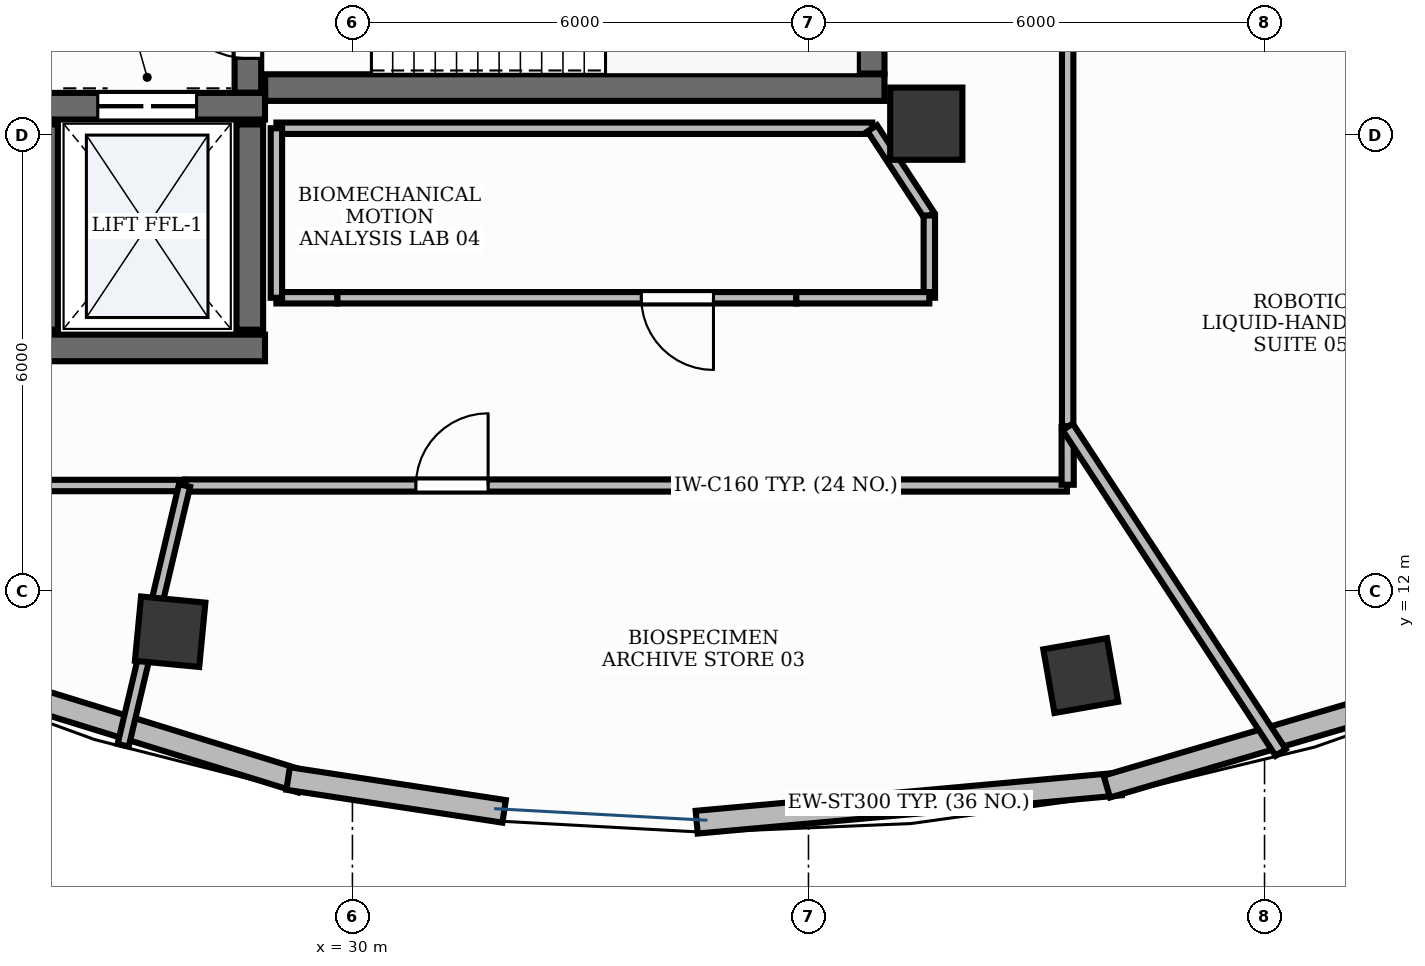
"""IFC4 building model, lengths in metres.
Left out: names, types, materials, properties, quantities, classifications, styles, units other than length and angle.
Written with IfcOpenShell. Run it as: python <this file> out.ifc"""

import sys

from ifc_helpers import new_model, si_unit, direction, frame, frame_2d, origin, origin_2d, place, context, subcontext, project, spatial, rectangle, extrude, element, fill, save


model = new_model("IFC4")
c1 = context("Model", 3, precision=1e-05, world=origin(), true_north=direction((0.0, 1.0)))
c2 = subcontext(c1, "Body", "Model", "MODEL_VIEW")
j1 = project(units=[si_unit("LENGTHUNIT", "METRE"), si_unit("PLANEANGLEUNIT", "RADIAN")], contexts=[c1])
p1 = place(None, origin())
s1 = spatial("IfcSite", under=j1, at=p1, CompositionType="ELEMENT")
p2 = place(p1, origin())
s2 = spatial("IfcBuilding", under=s1, at=p2, CompositionType="ELEMENT")
p3 = place(p2, frame((0.0, 0.0, 310.2)))
s3 = spatial("IfcBuildingStorey", under=s2, at=p3, CompositionType="ELEMENT", Elevation=310.2)
p4 = place(p3, frame((28.852, 18.625, 0.0), z_axis=(0.0, 0.0, 1.0), x_axis=(1.0, 0.0, 0.0)))
e1 = element("IfcWall", 1, at=p4, inside=s3, PredefinedType="SHEAR", context=c2, shape_type="SweptSolid", body=[
    extrude(rectangle(XDim=8.148, YDim=0.35, at=frame_2d((4.074, 0.0))), origin(), (0.0, 0.0, 1.0), 3.9),
])
p5 = place(p3, frame((36.825, 18.81, 0.0), z_axis=(0.0, 0.0, 1.0), x_axis=(0.0, 1.0, 0.0)))
e2 = element("IfcWall", 2, at=p5, inside=s3, PredefinedType="SHEAR", context=c2, shape_type="SweptSolid", body=[
    extrude(rectangle(XDim=3.08, YDim=0.35, at=frame_2d((1.54, 0.0))), origin(), (0.0, 0.0, 1.0), 3.9),
])
p6 = place(p3, frame((28.625, 18.557, 0.0), z_axis=(0.0, 0.0, 1.0), x_axis=(0.0, 1.0, 0.0)))
e3 = element("IfcWall", 3, at=p6, inside=s3, PredefinedType="SHEAR", context=c2, shape_type="SweptSolid", body=[
    extrude(rectangle(XDim=3.333, YDim=0.35, at=frame_2d((1.667, 0.0))), origin(), (0.0, 0.0, 1.0), 3.9),
])
p7 = place(p6, frame((0.453, 0.0, 0.0)))
e4 = element("IfcOpeningElement", 4, at=p7, cuts=e3, PredefinedType="OPENING", context=c2, shape_type="SweptSolid", body=[
    extrude(rectangle(XDim=1.05, YDim=2.15, at=frame_2d((0.525, 1.075))), frame((0.0, 0.19, 0.0), z_axis=(0.0, -1.0, 0.0), x_axis=(1.0, 0.0, 0.0)), (0.0, 0.0, 1.0), 0.38),
])
p8 = place(p3, frame((25.75, 15.2, 0.0), z_axis=(0.0, 0.0, 1.0), x_axis=(1.0, 0.0, 0.0)))
e5 = element("IfcWall", 5, at=p8, inside=s3, PredefinedType="SHEAR", context=c2, shape_type="SweptSolid", body=[
    extrude(rectangle(XDim=3.1, YDim=0.35, at=frame_2d((1.55, 0.0))), origin(), (0.0, 0.0, 1.0), 3.9),
])
p9 = place(p3, frame((25.75, 18.38, 0.0), z_axis=(0.0, 0.0, 1.0), x_axis=(1.0, 0.0, 0.0)))
e6 = element("IfcWall", 6, at=p9, inside=s3, PredefinedType="SHEAR", context=c2, shape_type="SweptSolid", body=[
    extrude(rectangle(XDim=3.1, YDim=0.35, at=frame_2d((1.55, 0.0))), origin(), (0.0, 0.0, 1.0), 3.9),
])
p10 = place(p9, frame((0.9, 0.0, 0.0)))
e7 = element("IfcOpeningElement", 7, at=p10, cuts=e6, PredefinedType="OPENING", context=c2, shape_type="SweptSolid", body=[
    extrude(rectangle(XDim=1.3, YDim=2.2, at=frame_2d((0.65, 1.1))), frame((0.0, 0.19, 0.0), z_axis=(0.0, -1.0, 0.0), x_axis=(1.0, 0.0, 0.0)), (0.0, 0.0, 1.0), 0.38),
])
for number, where, z_axis, x_axis in (
    (8, (25.95, 15.44, 0.0), (0.0, 0.0, 1.0), (0.0, 1.0, 0.0)),
    (9, (28.65, 15.44, 0.0), (0.0, 0.0, 1.0), (0.0, 1.0, 0.0)),
):
    element("IfcWall", number, at=place(p3, frame(where, z_axis=z_axis, x_axis=x_axis)), inside=s3, PredefinedType="SHEAR", context=c2, shape_type="SweptSolid", body=[
        extrude(rectangle(XDim=2.7, YDim=0.35, at=frame_2d((1.35, 0.0))), origin(), (0.0, 0.0, 1.0), 3.9),
    ])
p11 = place(p3, frame((37.55, 18.15, -0.0), z_axis=(0.0, 0.0, 1.0), x_axis=(1.0, 0.0, 0.0)))
e10 = element("IfcColumn", 10, at=p11, inside=s3, PredefinedType="PILASTER", context=c2, shape_type="SweptSolid", body=[
    extrude(rectangle(XDim=0.95, YDim=0.95, at=origin_2d()), origin(), (0.0, 0.0, 1.0), 3.901),
])
for number, where, z_axis, x_axis in (
    (11, (27.602, 11.466, -0.0), (0.0, 0.0, 1.0), (-0.995, 0.095, 0.0)),
    (12, (39.582, 10.889, -0.0), (0.0, 0.0, 1.0), (0.985, 0.173, 0.0)),
):
    element("IfcColumn", number, at=place(p3, frame(where, z_axis=z_axis, x_axis=x_axis)), inside=s3, PredefinedType="COLUMN", context=c2, shape_type="SweptSolid", body=[
        extrude(rectangle(XDim=0.85, YDim=0.85, at=origin_2d()), origin(), (0.0, 0.0, 1.0), 3.901),
    ])
p12 = place(p3, frame((24.088, 11.113, 0.0), z_axis=(0.0, 0.0, 1.0), x_axis=(0.955535200816, -0.29487705913, 0.0)))
e13 = element("IfcWall", 13, at=p12, inside=s3, PredefinedType="STANDARD", context=c2, shape_type="SweptSolid", body=[
    extrude(rectangle(XDim=5.485, YDim=0.3, at=frame_2d((2.743, 0.0))), origin(), (0.0, 0.0, 1.0), 3.9),
])
p13 = place(p3, frame((29.154, 9.535, 0.0), z_axis=(0.0, 0.0, 1.0), x_axis=(0.988626523862, -0.150391476873, 0.0)))
e14 = element("IfcWall", 14, at=p13, inside=s3, PredefinedType="STANDARD", context=c2, shape_type="SweptSolid", body=[
    extrude(rectangle(XDim=2.875, YDim=0.3, at=frame_2d((1.438, 0.0))), origin(), (0.0, 0.0, 1.0), 3.9),
])
p14 = place(p3, frame((34.529, 8.961, 0.0), z_axis=(0.0, 0.0, 1.0), x_axis=(0.995950163058, 0.089907022552, 0.0)))
e15 = element("IfcWall", 15, at=p14, inside=s3, PredefinedType="STANDARD", context=c2, shape_type="SweptSolid", body=[
    extrude(rectangle(XDim=5.602, YDim=0.3, at=frame_2d((2.801, 0.0))), origin(), (0.0, 0.0, 1.0), 3.9),
])
p15 = place(p3, frame((39.925, 9.429, 0.0), z_axis=(0.0, 0.0, 1.0), x_axis=(0.959276315934, 0.282469378321, 0.0)))
e16 = element("IfcWall", 16, at=p15, inside=s3, PredefinedType="STANDARD", context=c2, shape_type="SweptSolid", body=[
    extrude(rectangle(XDim=5.495, YDim=0.3, at=frame_2d((2.748, 0.0))), origin(), (0.0, 0.0, 1.0), 3.9),
])
p16 = place(p3, frame((27.802, 13.39, 0.0), z_axis=(0.0, 0.0, 1.0), x_axis=(1.0, 0.0, 0.0)))
e17 = element("IfcWall", 17, at=p16, inside=s3, PredefinedType="PARTITIONING", context=c2, shape_type="SweptSolid", body=[
    extrude(rectangle(XDim=11.598, YDim=0.16, at=frame_2d((5.799, 0.0))), origin(), (0.0, 0.0, 1.0), 2.91),
])
p17 = place(p16, frame((3.034, 0.0, 0.0)))
e18 = element("IfcOpeningElement", 18, at=p17, cuts=e17, PredefinedType="OPENING", context=c2, shape_type="SweptSolid", body=[
    extrude(rectangle(XDim=0.95, YDim=2.15, at=frame_2d((0.475, 1.075))), frame((0.0, 0.095, 0.0), z_axis=(0.0, -1.0, 0.0), x_axis=(1.0, 0.0, 0.0)), (0.0, 0.0, 1.0), 0.19),
])
p18 = place(p3, frame((35.84, 15.86, 0.0), z_axis=(0.0, 0.0, 1.0), x_axis=(-1.0, 0.0, 0.0)))
e19 = element("IfcWall", 19, at=p18, inside=s3, PredefinedType="PARTITIONING", context=c2, shape_type="SweptSolid", body=[
    extrude(rectangle(XDim=6.04, YDim=0.15, at=frame_2d((3.02, 0.0))), origin(), (0.0, 0.0, 1.0), 2.91),
])
p19 = place(p18, frame((1.09, 0.0, 0.0)))
e20 = element("IfcOpeningElement", 20, at=p19, cuts=e19, PredefinedType="OPENING", context=c2, shape_type="SweptSolid", body=[
    extrude(rectangle(XDim=0.95, YDim=2.15, at=frame_2d((0.475, 1.075))), frame((0.0, 0.09, 0.0), z_axis=(0.0, -1.0, 0.0), x_axis=(1.0, 0.0, 0.0)), (0.0, 0.0, 1.0), 0.18),
])
p20 = place(p3, frame((39.41, 14.171, 0.0), z_axis=(0.0, 0.0, 1.0), x_axis=(0.0, 1.0, 0.0)))
e21 = element("IfcWall", 21, at=p20, inside=s3, PredefinedType="PARTITIONING", context=c2, shape_type="SweptSolid", body=[
    extrude(rectangle(XDim=8.627, YDim=0.15, at=frame_2d((4.313, 0.0))), origin(), (0.0, 0.0, 1.0), 2.91),
])
p21 = place(p20, frame((7.113, 0.0, 0.0)))
e22 = element("IfcOpeningElement", 22, at=p21, cuts=e21, PredefinedType="OPENING", context=c2, shape_type="SweptSolid", body=[
    extrude(rectangle(XDim=0.95, YDim=2.15, at=frame_2d((0.475, 1.075))), frame((0.0, 0.09, 0.0), z_axis=(0.0, -1.0, 0.0), x_axis=(1.0, 0.0, 0.0)), (0.0, 0.0, 1.0), 0.18),
])
p22 = place(p3, frame((21.8, 13.39, 0.0), z_axis=(0.0, 0.0, 1.0), x_axis=(1.0, 0.0, 0.0)))
e23 = element("IfcWall", 23, at=p22, inside=s3, PredefinedType="PARTITIONING", context=c2, shape_type="SweptSolid", body=[
    extrude(rectangle(XDim=5.991, YDim=0.15, at=frame_2d((2.996, 0.0))), origin(), (0.0, 0.0, 1.0), 2.91),
])
p23 = place(p3, frame((27.792, 13.39, 0.0), z_axis=(0.0, 0.0, 1.0), x_axis=(-0.230015875141, -0.973186876804, 0.0)))
e24 = element("IfcWall", 24, at=p23, inside=s3, PredefinedType="PARTITIONING", context=c2, shape_type="SweptSolid", body=[
    extrude(rectangle(XDim=3.511, YDim=0.15, at=frame_2d((1.756, 0.0))), origin(), (0.0, 0.0, 1.0), 2.91),
])
p24 = place(p3, frame((39.41, 13.4, 0.0), z_axis=(0.0, 0.0, 1.0), x_axis=(0.0, 1.0, 0.0)))
e25 = element("IfcWall", 25, at=p24, inside=s3, PredefinedType="PARTITIONING", context=c2, shape_type="SweptSolid", body=[
    extrude(rectangle(XDim=0.761, YDim=0.16, at=frame_2d((0.381, 0.0))), origin(), (0.0, 0.0, 1.0), 2.91),
])
p25 = place(p3, frame((39.41, 14.161, 0.0), z_axis=(0.0, 0.0, 1.0), x_axis=(0.547559006328, -0.836767073079, 0.0)))
e26 = element("IfcWall", 26, at=p25, inside=s3, PredefinedType="PARTITIONING", context=c2, shape_type="SweptSolid", body=[
    extrude(rectangle(XDim=5.119, YDim=0.16, at=frame_2d((2.56, 0.0))), origin(), (0.0, 0.0, 1.0), 2.91),
])
p26 = place(p3, frame((29.0, 18.09, 0.0), z_axis=(0.0, 0.0, 1.0), x_axis=(1.0, 0.0, 0.0)))
e27 = element("IfcWall", 27, at=p26, inside=s3, PredefinedType="PARTITIONING", context=c2, shape_type="SweptSolid", body=[
    extrude(rectangle(XDim=7.839, YDim=0.15, at=frame_2d((3.919, 0.0))), origin(), (0.0, 0.0, 1.0), 2.91),
])
p27 = place(p3, frame((36.839, 18.09, 0.0), z_axis=(0.0, 0.0, 1.0), x_axis=(0.547532289366, -0.836784555367, 0.0)))
e28 = element("IfcWall", 28, at=p27, inside=s3, PredefinedType="PARTITIONING", context=c2, shape_type="SweptSolid", body=[
    extrude(rectangle(XDim=1.372, YDim=0.15, at=frame_2d((0.686, 0.0))), origin(), (0.0, 0.0, 1.0), 2.91),
])
p28 = place(p3, frame((37.59, 16.942, 0.0), z_axis=(0.0, 0.0, 1.0), x_axis=(0.0, -1.0, 0.0)))
e29 = element("IfcWall", 29, at=p28, inside=s3, PredefinedType="PARTITIONING", context=c2, shape_type="SweptSolid", body=[
    extrude(rectangle(XDim=1.082, YDim=0.15, at=frame_2d((0.541, 0.0))), origin(), (0.0, 0.0, 1.0), 2.91),
])
p29 = place(p3, frame((37.59, 15.86, 0.0), z_axis=(0.0, 0.0, 1.0), x_axis=(-1.0, 0.0, 0.0)))
e30 = element("IfcWall", 30, at=p29, inside=s3, PredefinedType="PARTITIONING", context=c2, shape_type="SweptSolid", body=[
    extrude(rectangle(XDim=1.75, YDim=0.15, at=frame_2d((0.875, 0.0))), origin(), (0.0, 0.0, 1.0), 2.91),
])
p30 = place(p3, frame((29.8, 15.86, 0.0), z_axis=(0.0, 0.0, 1.0), x_axis=(-1.0, 0.0, 0.0)))
e31 = element("IfcWall", 31, at=p30, inside=s3, PredefinedType="PARTITIONING", context=c2, shape_type="SweptSolid", body=[
    extrude(rectangle(XDim=0.8, YDim=0.15, at=frame_2d((0.4, 0.0))), origin(), (0.0, 0.0, 1.0), 2.91),
])
p31 = place(p3, frame((29.0, 15.86, 0.0), z_axis=(0.0, 0.0, 1.0), x_axis=(0.0, 1.0, 0.0)))
e32 = element("IfcWall", 32, at=p31, inside=s3, PredefinedType="PARTITIONING", context=c2, shape_type="SweptSolid", body=[
    extrude(rectangle(XDim=2.23, YDim=0.15, at=frame_2d((1.115, 0.0))), origin(), (0.0, 0.0, 1.0), 2.91),
])
p32 = place(p7, origin())
e33 = element("IfcDoor", 33, at=p32, inside=s3, OperationType="SINGLE_SWING_RIGHT", PredefinedType="DOOR", context=c2, shape_type="SweptSolid", body=[
    extrude(rectangle(XDim=1.05, YDim=2.15, at=frame_2d((0.525, 1.075))), frame((0.0, 0.025, 0.0), z_axis=(0.0, -1.0, 0.0), x_axis=(1.0, 0.0, 0.0)), (0.0, 0.0, 1.0), 0.05),
])
fill(e4, e33)
p33 = place(p10, origin())
e34 = element("IfcDoor", 34, at=p33, inside=s3, OperationType="DOUBLE_DOOR_SLIDING", PredefinedType="DOOR", context=c2, shape_type="SweptSolid", body=[
    extrude(rectangle(XDim=1.3, YDim=2.2, at=frame_2d((0.65, 1.1))), frame((0.0, 0.025, 0.0), z_axis=(0.0, -1.0, 0.0), x_axis=(1.0, 0.0, 0.0)), (0.0, 0.0, 1.0), 0.05),
])
fill(e7, e34)
p34 = place(p17, origin())
e35 = element("IfcDoor", 35, at=p34, inside=s3, OperationType="SINGLE_SWING_RIGHT", PredefinedType="DOOR", context=c2, shape_type="SweptSolid", body=[
    extrude(rectangle(XDim=0.95, YDim=2.15, at=frame_2d((0.475, 1.075))), frame((0.0, 0.025, 0.0), z_axis=(0.0, -1.0, 0.0), x_axis=(1.0, 0.0, 0.0)), (0.0, 0.0, 1.0), 0.05),
])
fill(e18, e35)
p35 = place(p19, origin())
e36 = element("IfcDoor", 36, at=p35, inside=s3, OperationType="SINGLE_SWING_LEFT", PredefinedType="DOOR", context=c2, shape_type="SweptSolid", body=[
    extrude(rectangle(XDim=0.95, YDim=2.15, at=frame_2d((0.475, 1.075))), frame((0.0, 0.025, 0.0), z_axis=(0.0, -1.0, 0.0), x_axis=(1.0, 0.0, 0.0)), (0.0, 0.0, 1.0), 0.05),
])
fill(e20, e36)
save(model, sys.argv[1])
